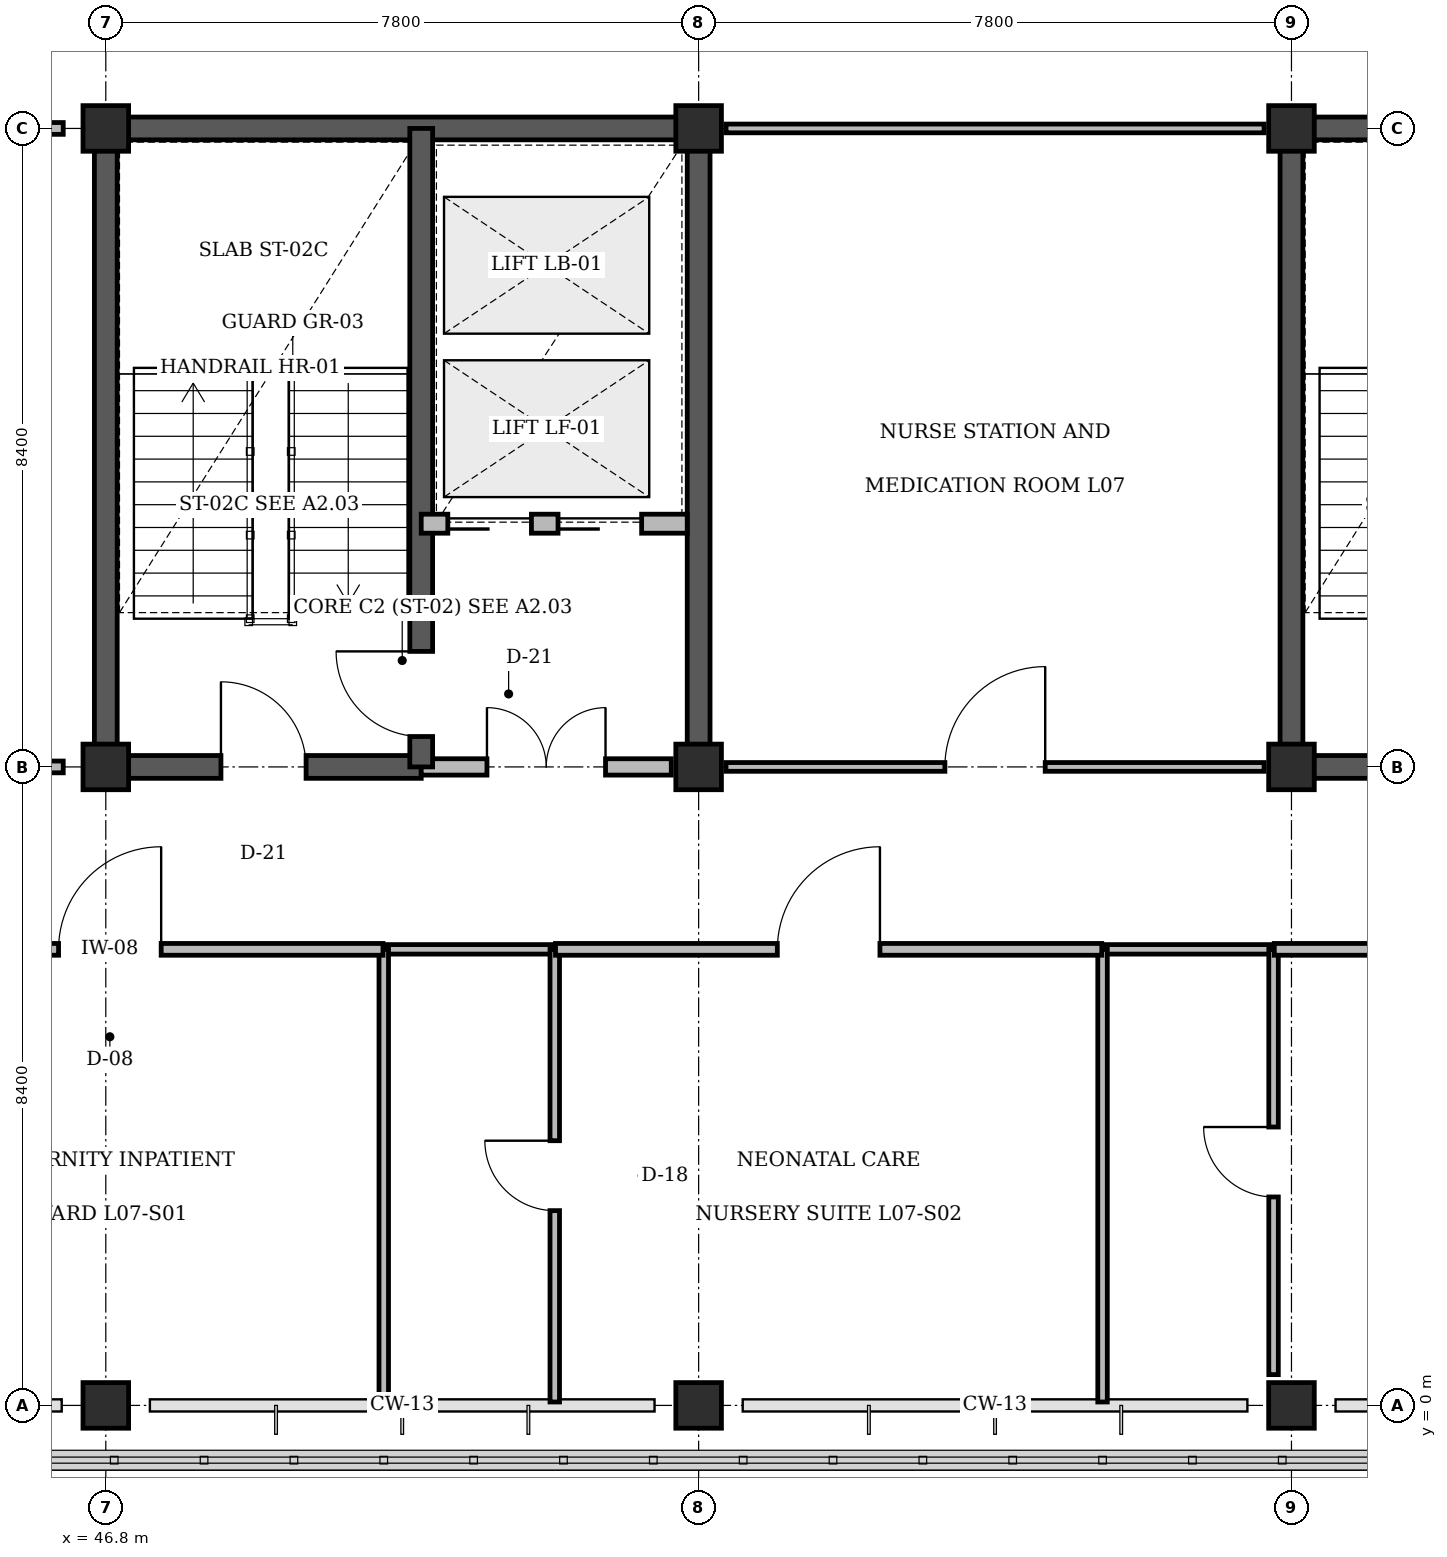
"""IFC4 building model, lengths in metres.
Left out: names, types, materials, properties, quantities, classifications, styles, units other than length and angle.
Written with IfcOpenShell. Run it as: python <this file> out.ifc"""

import sys

from ifc_helpers import new_model, si_unit, direction, frame, frame_2d, origin, origin_2d, place, context, subcontext, project, spatial, rectangle, extrude, element, fill, save


model = new_model("IFC4")
c1 = context("Model", 3, precision=1e-05, world=origin(), true_north=direction((0.0, 1.0)))
c2 = subcontext(c1, "Body", "Model", "MODEL_VIEW")
j1 = project(units=[si_unit("LENGTHUNIT", "METRE"), si_unit("PLANEANGLEUNIT", "RADIAN")], contexts=[c1])
p1 = place(None, origin())
s1 = spatial("IfcSite", under=j1, at=p1, CompositionType="ELEMENT")
p2 = place(p1, origin())
s2 = spatial("IfcBuilding", under=s1, at=p2, CompositionType="ELEMENT")
p3 = place(p2, frame((0.0, 0.0, 30.6)))
s3 = spatial("IfcBuildingStorey", under=s2, at=p3, CompositionType="ELEMENT", Elevation=30.6)
p4 = place(p3, frame((46.65, 16.8, 0.0), z_axis=(0.0, 0.0, 1.0), x_axis=(1.0, 0.0, 0.0)))
e1 = element("IfcWall", 1, at=p4, inside=s3, PredefinedType="SHEAR", context=c2, shape_type="SweptSolid", body=[
    extrude(rectangle(XDim=8.1, YDim=0.3, at=frame_2d((4.05, 0.0))), origin(), (0.0, 0.0, 1.0), 3.92),
])
for number, where, z_axis, x_axis in (
    (2, (46.8, 8.4, 0.0), (0.0, 0.0, 1.0), (0.0, 1.0, 0.0)),
    (3, (54.6, 8.4, 0.0), (0.0, 0.0, 1.0), (0.0, 1.0, 0.0)),
):
    element("IfcWall", number, at=place(p3, frame(where, z_axis=z_axis, x_axis=x_axis)), inside=s3, PredefinedType="SHEAR", context=c2, shape_type="SweptSolid", body=[
        extrude(rectangle(XDim=8.4, YDim=0.3, at=frame_2d((4.2, 0.0))), origin(), (0.0, 0.0, 1.0), 3.92),
    ])
p5 = place(p3, frame((62.25, 16.8, 0.0), z_axis=(0.0, 0.0, 1.0), x_axis=(1.0, 0.0, 0.0)))
e4 = element("IfcWall", 4, at=p5, inside=s3, PredefinedType="SHEAR", context=c2, shape_type="SweptSolid", body=[
    extrude(rectangle(XDim=8.1, YDim=0.3, at=frame_2d((4.05, 0.0))), origin(), (0.0, 0.0, 1.0), 3.92),
])
p6 = place(p3, frame((62.4, 8.4, 0.0), z_axis=(0.0, 0.0, 1.0), x_axis=(0.0, 1.0, 0.0)))
e5 = element("IfcWall", 5, at=p6, inside=s3, PredefinedType="SHEAR", context=c2, shape_type="SweptSolid", body=[
    extrude(rectangle(XDim=8.4, YDim=0.3, at=frame_2d((4.2, 0.0))), origin(), (0.0, 0.0, 1.0), 3.92),
])
for number, where, z_axis, x_axis in (
    (6, (46.8, 0.0, 0.0), (0.0, 0.0, 1.0), (1.0, 0.0, 0.0)),
    (7, (46.8, 8.4, 0.0), (0.0, 0.0, 1.0), (1.0, 0.0, 0.0)),
    (8, (46.8, 16.8, 0.0), (0.0, 0.0, 1.0), (1.0, 0.0, 0.0)),
    (9, (54.6, 0.0, 0.0), (0.0, 0.0, 1.0), (1.0, 0.0, 0.0)),
    (10, (54.6, 8.4, 0.0), (0.0, 0.0, 1.0), (1.0, 0.0, 0.0)),
    (11, (54.6, 16.8, 0.0), (0.0, 0.0, 1.0), (1.0, 0.0, 0.0)),
    (12, (62.4, 0.0, 0.0), (0.0, 0.0, 1.0), (1.0, 0.0, 0.0)),
    (13, (62.4, 8.4, 0.0), (0.0, 0.0, 1.0), (1.0, 0.0, 0.0)),
    (14, (62.4, 16.8, 0.0), (0.0, 0.0, 1.0), (1.0, 0.0, 0.0)),
):
    element("IfcColumn", number, at=place(p3, frame(where, z_axis=z_axis, x_axis=x_axis)), inside=s3, PredefinedType="COLUMN", context=c2, shape_type="SweptSolid", body=[
        extrude(rectangle(XDim=0.6, YDim=0.6, at=origin_2d()), origin(), (0.0, 0.0, 1.0), 4.2),
    ])
p7 = place(p3, frame((46.8, 8.4, 0.0), z_axis=(0.0, 0.0, 1.0), x_axis=(1.0, 0.0, 0.0)))
e15 = element("IfcWall", 15, at=p7, inside=s3, PredefinedType="SHEAR", context=c2, shape_type="SweptSolid", body=[
    extrude(rectangle(XDim=4.15, YDim=0.3, at=frame_2d((2.075, 0.0))), origin(), (0.0, 0.0, 1.0), 4.2),
])
p8 = place(p7, frame((1.515, 0.0, 0.0)))
e16 = element("IfcOpeningElement", 16, at=p8, cuts=e15, PredefinedType="OPENING", context=c2, shape_type="SweptSolid", body=[
    extrude(rectangle(XDim=1.12, YDim=2.15, at=frame_2d((0.56, 1.075))), frame((0.0, 0.16, 0.0), z_axis=(0.0, -1.0, 0.0), x_axis=(1.0, 0.0, 0.0)), (0.0, 0.0, 1.0), 0.32),
])
p9 = place(p3, frame((50.95, 8.4, 0.0), z_axis=(0.0, 0.0, 1.0), x_axis=(1.0, 0.0, 0.0)))
e17 = element("IfcWall", 17, at=p9, inside=s3, PredefinedType="STANDARD", context=c2, shape_type="SweptSolid", body=[
    extrude(rectangle(XDim=3.29, YDim=0.215, at=frame_2d((1.645, 0.0))), origin(), (0.0, 0.0, 1.0), 3.305),
])
p10 = place(p9, frame((0.865, 0.0, 0.0)))
e18 = element("IfcOpeningElement", 18, at=p10, cuts=e17, PredefinedType="OPENING", context=c2, shape_type="SweptSolid", body=[
    extrude(rectangle(XDim=1.56, YDim=2.2, at=frame_2d((0.78, 1.1))), frame((0.0, 0.118, 0.0), z_axis=(0.0, -1.0, 0.0), x_axis=(1.0, 0.0, 0.0)), (0.0, 0.0, 1.0), 0.235),
])
p11 = place(p3, frame((50.95, 8.4, 0.0), z_axis=(0.0, 0.0, 1.0), x_axis=(0.0, 1.0, 0.0)))
e19 = element("IfcWall", 19, at=p11, inside=s3, PredefinedType="SHEAR", context=c2, shape_type="SweptSolid", body=[
    extrude(rectangle(XDim=8.4, YDim=0.3, at=frame_2d((4.2, 0.0))), origin(), (0.0, 0.0, 1.0), 4.2),
])
p12 = place(p11, frame((0.4, 0.0, 0.0)))
e20 = element("IfcOpeningElement", 20, at=p12, cuts=e19, PredefinedType="OPENING", context=c2, shape_type="SweptSolid", body=[
    extrude(rectangle(XDim=1.12, YDim=2.15, at=frame_2d((0.56, 1.075))), frame((0.0, 0.16, 0.0), z_axis=(0.0, -1.0, 0.0), x_axis=(1.0, 0.0, 0.0)), (0.0, 0.0, 1.0), 0.32),
])
p13 = place(p3, frame((50.95, 11.6, 0.0), z_axis=(0.0, 0.0, 1.0), x_axis=(1.0, 0.0, 0.0)))
e21 = element("IfcWall", 21, at=p13, inside=s3, PredefinedType="STANDARD", context=c2, shape_type="SweptSolid", body=[
    extrude(rectangle(XDim=3.5, YDim=0.25, at=frame_2d((1.75, 0.0))), origin(), (0.0, 0.0, 1.0), 3.9),
])
p14 = place(p13, frame((0.35, 0.0, 0.0)))
e22 = element("IfcOpeningElement", 22, at=p14, cuts=e21, PredefinedType="OPENING", context=c2, shape_type="SweptSolid", body=[
    extrude(rectangle(XDim=1.1, YDim=2.2, at=frame_2d((0.55, 1.1))), frame((0.0, 0.135, 0.0), z_axis=(0.0, -1.0, 0.0), x_axis=(1.0, 0.0, 0.0)), (0.0, 0.0, 1.0), 0.27),
])
p15 = place(p13, frame((1.8, 0.0, 0.0)))
e23 = element("IfcOpeningElement", 23, at=p15, cuts=e21, PredefinedType="OPENING", context=c2, shape_type="SweptSolid", body=[
    extrude(rectangle(XDim=1.1, YDim=2.2, at=frame_2d((0.55, 1.1))), frame((0.0, 0.135, 0.0), z_axis=(0.0, -1.0, 0.0), x_axis=(1.0, 0.0, 0.0)), (0.0, 0.0, 1.0), 0.27),
])
p16 = place(p3, frame((62.4, 8.4, 0.0), z_axis=(0.0, 0.0, 1.0), x_axis=(1.0, 0.0, 0.0)))
e24 = element("IfcWall", 24, at=p16, inside=s3, PredefinedType="SHEAR", context=c2, shape_type="SweptSolid", body=[
    extrude(rectangle(XDim=4.15, YDim=0.3, at=frame_2d((2.075, 0.0))), origin(), (0.0, 0.0, 1.0), 4.2),
])
p17 = place(p16, frame((1.515, 0.0, 0.0)))
e25 = element("IfcOpeningElement", 25, at=p17, cuts=e24, PredefinedType="OPENING", context=c2, shape_type="SweptSolid", body=[
    extrude(rectangle(XDim=1.12, YDim=2.15, at=frame_2d((0.56, 1.075))), frame((0.0, 0.16, 0.0), z_axis=(0.0, -1.0, 0.0), x_axis=(1.0, 0.0, 0.0)), (0.0, 0.0, 1.0), 0.32),
])
p18 = place(p3, frame((50.457, 6.0, 0.0), z_axis=(0.0, 0.0, 1.0), x_axis=(1.0, 0.0, 0.0)))
e26 = element("IfcWall", 26, at=p18, inside=s3, PredefinedType="PARTITIONING", context=c2, shape_type="SweptSolid", body=[
    extrude(rectangle(XDim=2.25, YDim=0.125, at=frame_2d((1.125, 0.0))), origin(), (0.0, 0.0, 1.0), 3.9),
])
p19 = place(p3, frame((50.457, 0.045, 0.0), z_axis=(0.0, 0.0, 1.0), x_axis=(0.0, 1.0, 0.0)))
e27 = element("IfcWall", 27, at=p19, inside=s3, PredefinedType="PARTITIONING", context=c2, shape_type="SweptSolid", body=[
    extrude(rectangle(XDim=5.955, YDim=0.125, at=frame_2d((2.978, 0.0))), origin(), (0.0, 0.0, 1.0), 3.9),
])
p20 = place(p3, frame((52.707, 0.045, 0.0), z_axis=(0.0, 0.0, 1.0), x_axis=(0.0, 1.0, 0.0)))
e28 = element("IfcWall", 28, at=p20, inside=s3, PredefinedType="PARTITIONING", context=c2, shape_type="SweptSolid", body=[
    extrude(rectangle(XDim=5.955, YDim=0.125, at=frame_2d((2.978, 0.0))), origin(), (0.0, 0.0, 1.0), 3.9),
])
p21 = place(p20, frame((2.518, 0.0, 0.0)))
e29 = element("IfcOpeningElement", 29, at=p21, cuts=e28, PredefinedType="OPENING", context=c2, shape_type="SweptSolid", body=[
    extrude(rectangle(XDim=0.92, YDim=2.1, at=frame_2d((0.46, 1.05))), frame((0.0, 0.073, 0.0), z_axis=(0.0, -1.0, 0.0), x_axis=(1.0, 0.0, 0.0)), (0.0, 0.0, 1.0), 0.145),
])
p22 = place(p3, frame((59.914, 6.0, 0.0), z_axis=(0.0, 0.0, 1.0), x_axis=(1.0, 0.0, 0.0)))
e30 = element("IfcWall", 30, at=p22, inside=s3, PredefinedType="PARTITIONING", context=c2, shape_type="SweptSolid", body=[
    extrude(rectangle(XDim=2.25, YDim=0.125, at=frame_2d((1.125, 0.0))), origin(), (0.0, 0.0, 1.0), 3.9),
])
p23 = place(p3, frame((59.914, 0.045, 0.0), z_axis=(0.0, 0.0, 1.0), x_axis=(0.0, 1.0, 0.0)))
e31 = element("IfcWall", 31, at=p23, inside=s3, PredefinedType="PARTITIONING", context=c2, shape_type="SweptSolid", body=[
    extrude(rectangle(XDim=5.955, YDim=0.125, at=frame_2d((2.978, 0.0))), origin(), (0.0, 0.0, 1.0), 3.9),
])
p24 = place(p3, frame((62.164, 0.405, 0.0), z_axis=(0.0, 0.0, 1.0), x_axis=(0.0, 1.0, 0.0)))
e32 = element("IfcWall", 32, at=p24, inside=s3, PredefinedType="PARTITIONING", context=c2, shape_type="SweptSolid", body=[
    extrude(rectangle(XDim=5.595, YDim=0.125, at=frame_2d((2.797, 0.0))), origin(), (0.0, 0.0, 1.0), 3.305),
])
p25 = place(p24, frame((2.337, 0.0, 0.0)))
e33 = element("IfcOpeningElement", 33, at=p25, cuts=e32, PredefinedType="OPENING", context=c2, shape_type="SweptSolid", body=[
    extrude(rectangle(XDim=0.92, YDim=2.1, at=frame_2d((0.46, 1.05))), frame((0.0, 0.073, 0.0), z_axis=(0.0, -1.0, 0.0), x_axis=(1.0, 0.0, 0.0)), (0.0, 0.0, 1.0), 0.145),
])
p26 = place(p3, frame((43.26, 6.0, 0.0), z_axis=(0.0, 0.0, 1.0), x_axis=(1.0, 0.0, 0.0)))
e34 = element("IfcWall", 34, at=p26, inside=s3, PredefinedType="PARTITIONING", context=c2, shape_type="SweptSolid", body=[
    extrude(rectangle(XDim=7.187, YDim=0.155, at=frame_2d((3.594, 0.0))), origin(), (0.0, 0.0, 1.0), 3.9),
])
p27 = place(p26, frame((2.918, 0.0, 0.0)))
e35 = element("IfcOpeningElement", 35, at=p27, cuts=e34, PredefinedType="OPENING", context=c2, shape_type="SweptSolid", body=[
    extrude(rectangle(XDim=1.35, YDim=2.2, at=frame_2d((0.675, 1.1))), frame((0.0, 0.087, 0.0), z_axis=(0.0, -1.0, 0.0), x_axis=(1.0, 0.0, 0.0)), (0.0, 0.0, 1.0), 0.175),
])
p28 = place(p3, frame((52.717, 6.0, 0.0), z_axis=(0.0, 0.0, 1.0), x_axis=(1.0, 0.0, 0.0)))
e36 = element("IfcWall", 36, at=p28, inside=s3, PredefinedType="PARTITIONING", context=c2, shape_type="SweptSolid", body=[
    extrude(rectangle(XDim=7.187, YDim=0.155, at=frame_2d((3.594, 0.0))), origin(), (0.0, 0.0, 1.0), 3.9),
])
p29 = place(p28, frame((2.918, 0.0, 0.0)))
e37 = element("IfcOpeningElement", 37, at=p29, cuts=e36, PredefinedType="OPENING", context=c2, shape_type="SweptSolid", body=[
    extrude(rectangle(XDim=1.35, YDim=2.2, at=frame_2d((0.675, 1.1))), frame((0.0, 0.087, 0.0), z_axis=(0.0, -1.0, 0.0), x_axis=(1.0, 0.0, 0.0)), (0.0, 0.0, 1.0), 0.175),
])
p30 = place(p3, frame((62.174, 6.0, 0.0), z_axis=(0.0, 0.0, 1.0), x_axis=(1.0, 0.0, 0.0)))
e38 = element("IfcWall", 38, at=p30, inside=s3, PredefinedType="PARTITIONING", context=c2, shape_type="SweptSolid", body=[
    extrude(rectangle(XDim=7.187, YDim=0.155, at=frame_2d((3.594, 0.0))), origin(), (0.0, 0.0, 1.0), 3.9),
])
p31 = place(p30, frame((2.918, 0.0, 0.0)))
e39 = element("IfcOpeningElement", 39, at=p31, cuts=e38, PredefinedType="OPENING", context=c2, shape_type="SweptSolid", body=[
    extrude(rectangle(XDim=1.35, YDim=2.2, at=frame_2d((0.675, 1.1))), frame((0.0, 0.087, 0.0), z_axis=(0.0, -1.0, 0.0), x_axis=(1.0, 0.0, 0.0)), (0.0, 0.0, 1.0), 0.175),
])
p32 = place(p3, frame((54.96, 8.4, 0.0), z_axis=(0.0, 0.0, 1.0), x_axis=(1.0, 0.0, 0.0)))
e40 = element("IfcWall", 40, at=p32, inside=s3, PredefinedType="PARTITIONING", context=c2, shape_type="SweptSolid", body=[
    extrude(rectangle(XDim=7.08, YDim=0.115, at=frame_2d((3.54, 0.0))), origin(), (0.0, 0.0, 1.0), 3.305),
])
p33 = place(p32, frame((2.88, 0.0, 0.0)))
e41 = element("IfcOpeningElement", 41, at=p33, cuts=e40, PredefinedType="OPENING", context=c2, shape_type="SweptSolid", body=[
    extrude(rectangle(XDim=1.32, YDim=2.15, at=frame_2d((0.66, 1.075))), frame((0.0, 0.067, 0.0), z_axis=(0.0, -1.0, 0.0), x_axis=(1.0, 0.0, 0.0)), (0.0, 0.0, 1.0), 0.135),
])
p34 = place(p3, frame((54.96, 16.8, 0.0), z_axis=(0.0, 0.0, 1.0), x_axis=(1.0, 0.0, 0.0)))
e42 = element("IfcWall", 42, at=p34, inside=s3, PredefinedType="PARTITIONING", context=c2, shape_type="SweptSolid", body=[
    extrude(rectangle(XDim=7.08, YDim=0.115, at=frame_2d((3.54, 0.0))), origin(), (0.0, 0.0, 1.0), 3.305),
])
p35 = place(p3, frame((41.01, 8.4, 0.0), z_axis=(0.0, 0.0, 1.0), x_axis=(1.0, 0.0, 0.0)))
e43 = element("IfcWall", 43, at=p35, inside=s3, PredefinedType="PARTITIONING", context=c2, shape_type="SweptSolid", body=[
    extrude(rectangle(XDim=5.23, YDim=0.155, at=frame_2d((2.615, 0.0))), origin(), (0.0, 0.0, 1.0), 3.305),
])
p36 = place(p35, frame((1.915, 0.0, 0.0)))
e44 = element("IfcOpeningElement", 44, at=p36, cuts=e43, PredefinedType="OPENING", context=c2, shape_type="SweptSolid", body=[
    extrude(rectangle(XDim=1.4, YDim=2.2, at=frame_2d((0.7, 1.1))), frame((0.0, 0.087, 0.0), z_axis=(0.0, -1.0, 0.0), x_axis=(1.0, 0.0, 0.0)), (0.0, 0.0, 1.0), 0.175),
])
p37 = place(p3, frame((41.01, 16.8, 0.0), z_axis=(0.0, 0.0, 1.0), x_axis=(1.0, 0.0, 0.0)))
e45 = element("IfcWall", 45, at=p37, inside=s3, PredefinedType="PARTITIONING", context=c2, shape_type="SweptSolid", body=[
    extrude(rectangle(XDim=5.23, YDim=0.155, at=frame_2d((2.615, 0.0))), origin(), (0.0, 0.0, 1.0), 3.305),
])
p38 = place(p8, origin())
e46 = element("IfcDoor", 46, at=p38, inside=s3, OperationType="SINGLE_SWING_LEFT", PredefinedType="DOOR", context=c2, shape_type="SweptSolid", body=[
    extrude(rectangle(XDim=1.12, YDim=2.15, at=frame_2d((0.56, 1.075))), frame((0.0, 0.025, 0.0), z_axis=(0.0, -1.0, 0.0), x_axis=(1.0, 0.0, 0.0)), (0.0, 0.0, 1.0), 0.05),
])
fill(e16, e46)
p39 = place(p10, origin())
e47 = element("IfcDoor", 47, at=p39, inside=s3, OperationType="DOUBLE_DOOR_SINGLE_SWING", PredefinedType="DOOR", context=c2, shape_type="SweptSolid", body=[
    extrude(rectangle(XDim=1.56, YDim=2.2, at=frame_2d((0.78, 1.1))), frame((0.0, 0.025, 0.0), z_axis=(0.0, -1.0, 0.0), x_axis=(1.0, 0.0, 0.0)), (0.0, 0.0, 1.0), 0.05),
])
fill(e18, e47)
p40 = place(p12, origin())
e48 = element("IfcDoor", 48, at=p40, inside=s3, OperationType="SINGLE_SWING_RIGHT", PredefinedType="DOOR", context=c2, shape_type="SweptSolid", body=[
    extrude(rectangle(XDim=1.12, YDim=2.15, at=frame_2d((0.56, 1.075))), frame((0.0, 0.025, 0.0), z_axis=(0.0, -1.0, 0.0), x_axis=(1.0, 0.0, 0.0)), (0.0, 0.0, 1.0), 0.05),
])
fill(e20, e48)
p41 = place(p14, origin())
e49 = element("IfcDoor", 49, at=p41, inside=s3, OperationType="SLIDING_TO_LEFT", PredefinedType="DOOR", context=c2, shape_type="SweptSolid", body=[
    extrude(rectangle(XDim=1.1, YDim=2.2, at=frame_2d((0.55, 1.1))), frame((0.0, 0.025, 0.0), z_axis=(0.0, -1.0, 0.0), x_axis=(1.0, 0.0, 0.0)), (0.0, 0.0, 1.0), 0.05),
])
fill(e22, e49)
p42 = place(p15, origin())
e50 = element("IfcDoor", 50, at=p42, inside=s3, OperationType="SLIDING_TO_LEFT", PredefinedType="DOOR", context=c2, shape_type="SweptSolid", body=[
    extrude(rectangle(XDim=1.1, YDim=2.2, at=frame_2d((0.55, 1.1))), frame((0.0, 0.025, 0.0), z_axis=(0.0, -1.0, 0.0), x_axis=(1.0, 0.0, 0.0)), (0.0, 0.0, 1.0), 0.05),
])
fill(e23, e50)
p43 = place(p21, origin())
e51 = element("IfcDoor", 51, at=p43, inside=s3, OperationType="SINGLE_SWING_RIGHT", PredefinedType="DOOR", context=c2, shape_type="SweptSolid", body=[
    extrude(rectangle(XDim=0.92, YDim=2.1, at=frame_2d((0.46, 1.05))), frame((0.0, 0.025, 0.0), z_axis=(0.0, -1.0, 0.0), x_axis=(1.0, 0.0, 0.0)), (0.0, 0.0, 1.0), 0.05),
])
fill(e29, e51)
p44 = place(p25, origin())
e52 = element("IfcDoor", 52, at=p44, inside=s3, OperationType="SINGLE_SWING_RIGHT", PredefinedType="DOOR", context=c2, shape_type="SweptSolid", body=[
    extrude(rectangle(XDim=0.92, YDim=2.1, at=frame_2d((0.46, 1.05))), frame((0.0, 0.025, 0.0), z_axis=(0.0, -1.0, 0.0), x_axis=(1.0, 0.0, 0.0)), (0.0, 0.0, 1.0), 0.05),
])
fill(e33, e52)
p45 = place(p27, origin())
e53 = element("IfcDoor", 53, at=p45, inside=s3, OperationType="SINGLE_SWING_RIGHT", PredefinedType="DOOR", context=c2, shape_type="SweptSolid", body=[
    extrude(rectangle(XDim=1.35, YDim=2.2, at=frame_2d((0.675, 1.1))), frame((0.0, 0.025, 0.0), z_axis=(0.0, -1.0, 0.0), x_axis=(1.0, 0.0, 0.0)), (0.0, 0.0, 1.0), 0.05),
])
fill(e35, e53)
p46 = place(p29, origin())
e54 = element("IfcDoor", 54, at=p46, inside=s3, OperationType="SINGLE_SWING_RIGHT", PredefinedType="DOOR", context=c2, shape_type="SweptSolid", body=[
    extrude(rectangle(XDim=1.35, YDim=2.2, at=frame_2d((0.675, 1.1))), frame((0.0, 0.025, 0.0), z_axis=(0.0, -1.0, 0.0), x_axis=(1.0, 0.0, 0.0)), (0.0, 0.0, 1.0), 0.05),
])
fill(e37, e54)
p47 = place(p33, origin())
e55 = element("IfcDoor", 55, at=p47, inside=s3, OperationType="SINGLE_SWING_RIGHT", PredefinedType="DOOR", context=c2, shape_type="SweptSolid", body=[
    extrude(rectangle(XDim=1.32, YDim=2.15, at=frame_2d((0.66, 1.075))), frame((0.0, 0.025, 0.0), z_axis=(0.0, -1.0, 0.0), x_axis=(1.0, 0.0, 0.0)), (0.0, 0.0, 1.0), 0.05),
])
fill(e41, e55)
save(model, sys.argv[1])
